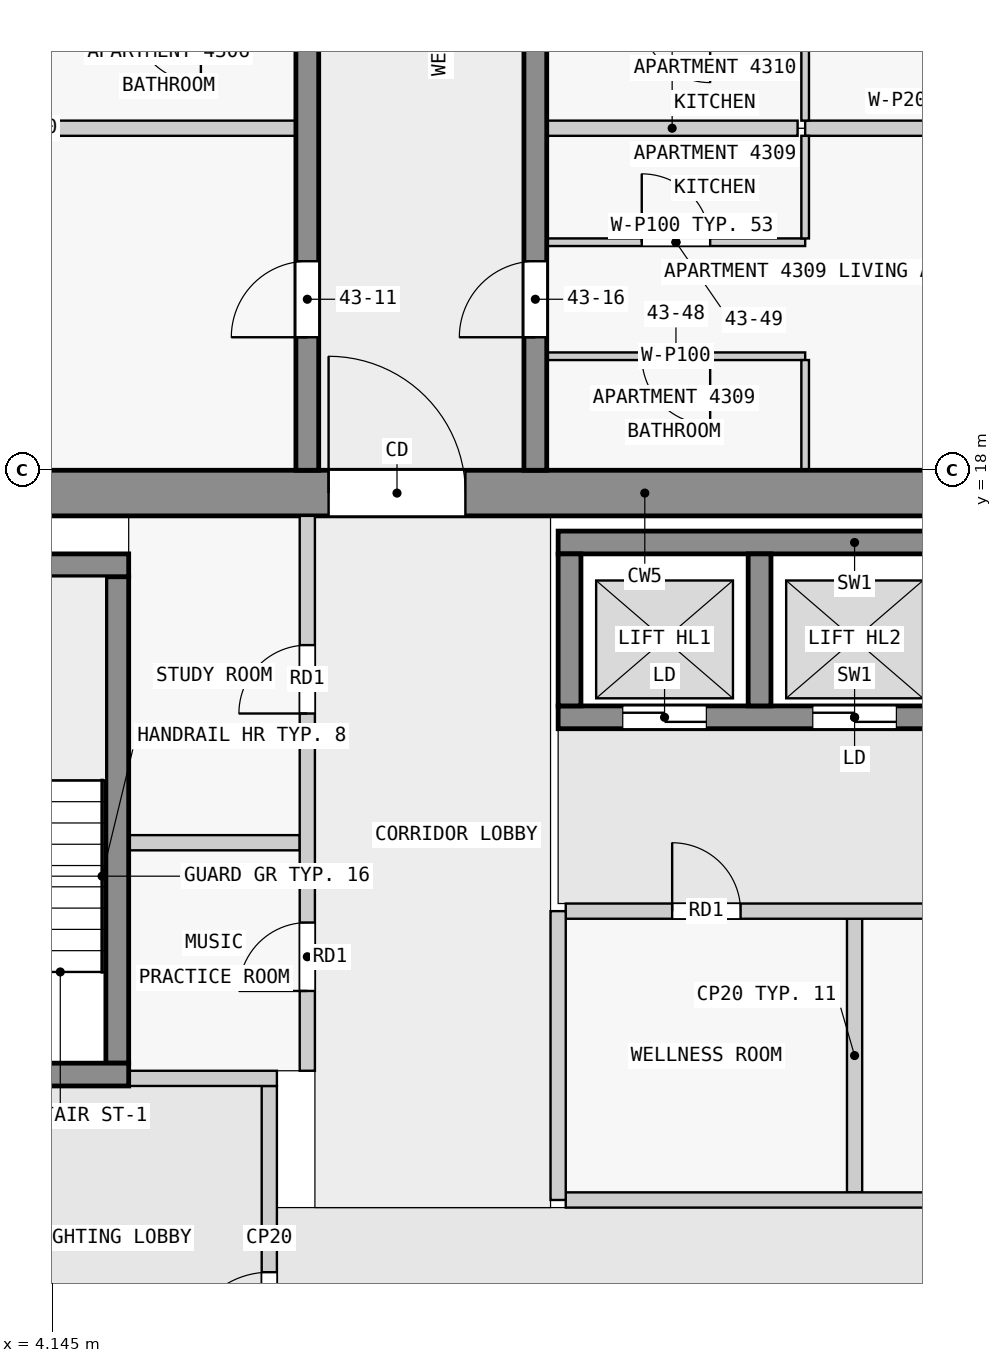
"""IFC4 building model, lengths in metres.
Left out: names, types, materials, properties, quantities, classifications, styles, units other than length and angle.
Written with IfcOpenShell. Run it as: python <this file> out.ifc"""

import sys

from ifc_helpers import new_model, si_unit, direction, frame, frame_2d, origin, place, context, subcontext, project, spatial, rectangle, extrude, element, fill, save


model = new_model("IFC4")
c1 = context("Model", 3, precision=1e-05, world=origin(), true_north=direction((0.0, 1.0)))
c2 = subcontext(c1, "Body", "Model", "MODEL_VIEW")
j1 = project(units=[si_unit("LENGTHUNIT", "METRE"), si_unit("PLANEANGLEUNIT", "RADIAN")], contexts=[c1])
p1 = place(None, origin())
s1 = spatial("IfcSite", under=j1, at=p1, CompositionType="ELEMENT")
p2 = place(p1, origin())
s2 = spatial("IfcBuilding", under=s1, at=p2, CompositionType="ELEMENT")
p3 = place(p2, frame((0.0, 0.0, 167.4)))
s3 = spatial("IfcBuildingStorey", under=s2, at=p3, CompositionType="ELEMENT", Elevation=167.4)
p4 = place(p3, frame((1.38, 17.7, 0.0), z_axis=(0.0, 0.0, 1.0), x_axis=(1.0, 0.0, 0.0)))
e1 = element("IfcWall", 1, at=p4, inside=s3, PredefinedType="SHEAR", context=c2, shape_type="SweptSolid", body=[
    extrude(rectangle(XDim=21.12, YDim=0.6, at=frame_2d((10.56, 0.0))), origin(), (0.0, 0.0, 1.0), 3.25),
])
p5 = place(p4, frame((6.4, 0.0, 0.0)))
e2 = element("IfcOpeningElement", 2, at=p5, cuts=e1, PredefinedType="OPENING", context=c2, shape_type="SweptSolid", body=[
    extrude(rectangle(XDim=1.8, YDim=2.1, at=frame_2d((0.9, 1.05))), frame((0.0, 0.31, 0.0), z_axis=(0.0, -1.0, 0.0), x_axis=(1.0, 0.0, 0.0)), (0.0, 0.0, 1.0), 0.62),
])
p6 = place(p3, frame((2.3, 10.05, 0.0), z_axis=(0.0, 0.0, 1.0), x_axis=(1.0, 0.0, 0.0)))
e3 = element("IfcWall", 3, at=p6, inside=s3, PredefinedType="SHEAR", context=c2, shape_type="SweptSolid", body=[
    extrude(rectangle(XDim=2.85, YDim=0.3, at=frame_2d((1.425, 0.0))), origin(), (0.0, 0.0, 1.0), 3.25),
])
p7 = place(p6, frame((0.25, 0.0, 0.0)))
e4 = element("IfcOpeningElement", 4, at=p7, cuts=e3, PredefinedType="OPENING", context=c2, shape_type="SweptSolid", body=[
    extrude(rectangle(XDim=1.1, YDim=2.1, at=frame_2d((0.55, 1.05))), frame((0.0, 0.16, 0.0), z_axis=(0.0, -1.0, 0.0), x_axis=(1.0, 0.0, 0.0)), (0.0, 0.0, 1.0), 0.32),
])
p8 = place(p3, frame((5.0, 10.2, 0.0), z_axis=(0.0, 0.0, 1.0), x_axis=(0.0, 1.0, 0.0)))
e5 = element("IfcWall", 5, at=p8, inside=s3, PredefinedType="SHEAR", context=c2, shape_type="SweptSolid", body=[
    extrude(rectangle(XDim=6.4, YDim=0.3, at=frame_2d((3.2, 0.0))), origin(), (0.0, 0.0, 1.0), 3.25),
])
p9 = place(p3, frame((2.3, 16.75, 0.0), z_axis=(0.0, 0.0, 1.0), x_axis=(1.0, 0.0, 0.0)))
e6 = element("IfcWall", 6, at=p9, inside=s3, PredefinedType="SHEAR", context=c2, shape_type="SweptSolid", body=[
    extrude(rectangle(XDim=2.85, YDim=0.3, at=frame_2d((1.425, 0.0))), origin(), (0.0, 0.0, 1.0), 3.25),
])
p10 = place(p3, frame((10.8, 17.05, 0.0), z_axis=(0.0, 0.0, 1.0), x_axis=(1.0, 0.0, 0.0)))
e7 = element("IfcWall", 7, at=p10, inside=s3, PredefinedType="SHEAR", context=c2, shape_type="SweptSolid", body=[
    extrude(rectangle(XDim=7.8, YDim=0.3, at=frame_2d((3.9, 0.0))), origin(), (0.0, 0.0, 1.0), 3.25),
])
p11 = place(p3, frame((10.8, 14.75, 0.0), z_axis=(0.0, 0.0, 1.0), x_axis=(1.0, 0.0, 0.0)))
e8 = element("IfcWall", 8, at=p11, inside=s3, PredefinedType="SHEAR", context=c2, shape_type="SweptSolid", body=[
    extrude(rectangle(XDim=7.8, YDim=0.3, at=frame_2d((3.9, 0.0))), origin(), (0.0, 0.0, 1.0), 3.25),
])
p12 = place(p11, frame((0.85, 0.0, 0.0)))
e9 = element("IfcOpeningElement", 9, at=p12, cuts=e8, PredefinedType="OPENING", context=c2, shape_type="SweptSolid", body=[
    extrude(rectangle(XDim=1.1, YDim=2.1, at=frame_2d((0.55, 1.05))), frame((0.0, 0.16, 0.0), z_axis=(0.0, -1.0, 0.0), x_axis=(1.0, 0.0, 0.0)), (0.0, 0.0, 1.0), 0.32),
])
p13 = place(p11, frame((3.35, 0.0, 0.0)))
e10 = element("IfcOpeningElement", 10, at=p13, cuts=e8, PredefinedType="OPENING", context=c2, shape_type="SweptSolid", body=[
    extrude(rectangle(XDim=1.1, YDim=2.1, at=frame_2d((0.55, 1.05))), frame((0.0, 0.16, 0.0), z_axis=(0.0, -1.0, 0.0), x_axis=(1.0, 0.0, 0.0)), (0.0, 0.0, 1.0), 0.32),
])
p14 = place(p11, frame((5.85, 0.0, 0.0)))
e11 = element("IfcOpeningElement", 11, at=p14, cuts=e8, PredefinedType="OPENING", context=c2, shape_type="SweptSolid", body=[
    extrude(rectangle(XDim=1.1, YDim=2.1, at=frame_2d((0.55, 1.05))), frame((0.0, 0.16, 0.0), z_axis=(0.0, -1.0, 0.0), x_axis=(1.0, 0.0, 0.0)), (0.0, 0.0, 1.0), 0.32),
])
for number, where, z_axis, x_axis in (
    (12, (10.95, 14.9, 0.0), (0.0, 0.0, 1.0), (0.0, 1.0, 0.0)),
    (13, (13.45, 14.9, 0.0), (0.0, 0.0, 1.0), (0.0, 1.0, 0.0)),
):
    element("IfcWall", number, at=place(p3, frame(where, z_axis=z_axis, x_axis=x_axis)), inside=s3, PredefinedType="SHEAR", context=c2, shape_type="SweptSolid", body=[
        extrude(rectangle(XDim=2.0, YDim=0.3, at=frame_2d((1.0, 0.0))), origin(), (0.0, 0.0, 1.0), 3.25),
    ])
p15 = place(p3, frame((7.5, 18.0, 0.0), z_axis=(0.0, 0.0, 1.0), x_axis=(0.0, 1.0, 0.0)))
e14 = element("IfcWall", 14, at=p15, inside=s3, PredefinedType="SHEAR", context=c2, shape_type="SweptSolid", body=[
    extrude(rectangle(XDim=27.0, YDim=0.3, at=frame_2d((13.5, 0.0))), origin(), (0.0, 0.0, 1.0), 3.25),
])
p16 = place(p15, frame((1.75, 0.0, 0.0)))
e15 = element("IfcOpeningElement", 15, at=p16, cuts=e14, PredefinedType="OPENING", context=c2, shape_type="SweptSolid", body=[
    extrude(rectangle(XDim=1.0, YDim=2.1, at=frame_2d((0.5, 1.05))), frame((0.0, 0.16, 0.0), z_axis=(0.0, -1.0, 0.0), x_axis=(1.0, 0.0, 0.0)), (0.0, 0.0, 1.0), 0.32),
])
p17 = place(p15, frame((6.25, 0.0, 0.0)))
e16 = element("IfcOpeningElement", 16, at=p17, cuts=e14, PredefinedType="OPENING", context=c2, shape_type="SweptSolid", body=[
    extrude(rectangle(XDim=1.0, YDim=2.1, at=frame_2d((0.5, 1.05))), frame((0.0, 0.16, 0.0), z_axis=(0.0, -1.0, 0.0), x_axis=(1.0, 0.0, 0.0)), (0.0, 0.0, 1.0), 0.32),
])
p18 = place(p15, frame((10.75, 0.0, 0.0)))
e17 = element("IfcOpeningElement", 17, at=p18, cuts=e14, PredefinedType="OPENING", context=c2, shape_type="SweptSolid", body=[
    extrude(rectangle(XDim=1.0, YDim=2.1, at=frame_2d((0.5, 1.05))), frame((0.0, 0.16, 0.0), z_axis=(0.0, -1.0, 0.0), x_axis=(1.0, 0.0, 0.0)), (0.0, 0.0, 1.0), 0.32),
])
p19 = place(p15, frame((15.25, 0.0, 0.0)))
e18 = element("IfcOpeningElement", 18, at=p19, cuts=e14, PredefinedType="OPENING", context=c2, shape_type="SweptSolid", body=[
    extrude(rectangle(XDim=1.0, YDim=2.1, at=frame_2d((0.5, 1.05))), frame((0.0, 0.16, 0.0), z_axis=(0.0, -1.0, 0.0), x_axis=(1.0, 0.0, 0.0)), (0.0, 0.0, 1.0), 0.32),
])
p20 = place(p15, frame((21.35, 0.0, 0.0)))
e19 = element("IfcOpeningElement", 19, at=p20, cuts=e14, PredefinedType="OPENING", context=c2, shape_type="SweptSolid", body=[
    extrude(rectangle(XDim=1.0, YDim=2.1, at=frame_2d((0.5, 1.05))), frame((0.0, 0.16, 0.0), z_axis=(0.0, -1.0, 0.0), x_axis=(1.0, 0.0, 0.0)), (0.0, 0.0, 1.0), 0.32),
])
p21 = place(p3, frame((10.5, 18.0, 0.0), z_axis=(0.0, 0.0, 1.0), x_axis=(0.0, 1.0, 0.0)))
e20 = element("IfcWall", 20, at=p21, inside=s3, PredefinedType="SHEAR", context=c2, shape_type="SweptSolid", body=[
    extrude(rectangle(XDim=27.0, YDim=0.3, at=frame_2d((13.5, 0.0))), origin(), (0.0, 0.0, 1.0), 3.25),
])
p22 = place(p21, frame((1.75, 0.0, 0.0)))
e21 = element("IfcOpeningElement", 21, at=p22, cuts=e20, PredefinedType="OPENING", context=c2, shape_type="SweptSolid", body=[
    extrude(rectangle(XDim=1.0, YDim=2.1, at=frame_2d((0.5, 1.05))), frame((0.0, 0.16, 0.0), z_axis=(0.0, -1.0, 0.0), x_axis=(1.0, 0.0, 0.0)), (0.0, 0.0, 1.0), 0.32),
])
p23 = place(p21, frame((6.25, 0.0, 0.0)))
e22 = element("IfcOpeningElement", 22, at=p23, cuts=e20, PredefinedType="OPENING", context=c2, shape_type="SweptSolid", body=[
    extrude(rectangle(XDim=1.0, YDim=2.1, at=frame_2d((0.5, 1.05))), frame((0.0, 0.16, 0.0), z_axis=(0.0, -1.0, 0.0), x_axis=(1.0, 0.0, 0.0)), (0.0, 0.0, 1.0), 0.32),
])
p24 = place(p21, frame((10.35, 0.0, 0.0)))
e23 = element("IfcOpeningElement", 23, at=p24, cuts=e20, PredefinedType="OPENING", context=c2, shape_type="SweptSolid", body=[
    extrude(rectangle(XDim=1.8, YDim=2.1, at=frame_2d((0.9, 1.05))), frame((0.0, 0.16, 0.0), z_axis=(0.0, -1.0, 0.0), x_axis=(1.0, 0.0, 0.0)), (0.0, 0.0, 1.0), 0.32),
])
p25 = place(p21, frame((17.55, 0.0, 0.0)))
e24 = element("IfcOpeningElement", 24, at=p25, cuts=e20, PredefinedType="OPENING", context=c2, shape_type="SweptSolid", body=[
    extrude(rectangle(XDim=1.0, YDim=2.1, at=frame_2d((0.5, 1.05))), frame((0.0, 0.16, 0.0), z_axis=(0.0, -1.0, 0.0), x_axis=(1.0, 0.0, 0.0)), (0.0, 0.0, 1.0), 0.32),
])
p26 = place(p21, frame((23.25, 0.0, 0.0)))
e25 = element("IfcOpeningElement", 25, at=p26, cuts=e20, PredefinedType="OPENING", context=c2, shape_type="SweptSolid", body=[
    extrude(rectangle(XDim=0.9, YDim=2.1, at=frame_2d((0.45, 1.05))), frame((0.0, 0.16, 0.0), z_axis=(0.0, -1.0, 0.0), x_axis=(1.0, 0.0, 0.0)), (0.0, 0.0, 1.0), 0.32),
])
p27 = place(p21, frame((25.45, 0.0, 0.0)))
e26 = element("IfcOpeningElement", 26, at=p27, cuts=e20, PredefinedType="OPENING", context=c2, shape_type="SweptSolid", body=[
    extrude(rectangle(XDim=1.0, YDim=2.1, at=frame_2d((0.5, 1.05))), frame((0.0, 0.16, 0.0), z_axis=(0.0, -1.0, 0.0), x_axis=(1.0, 0.0, 0.0)), (0.0, 0.0, 1.0), 0.32),
])
p28 = place(p3, frame((7.0, 5.9, 0.0), z_axis=(0.0, 0.0, 1.0), x_axis=(0.0, 1.0, 0.0)))
e27 = element("IfcWall", 27, at=p28, inside=s3, PredefinedType="PARTITIONING", context=c2, shape_type="SweptSolid", body=[
    extrude(rectangle(XDim=4.0, YDim=0.2, at=frame_2d((2.0, 0.0))), origin(), (0.0, 0.0, 1.0), 3.25),
])
p29 = place(p28, frame((0.45, 0.0, 0.0)))
e28 = element("IfcOpeningElement", 28, at=p29, cuts=e27, PredefinedType="OPENING", context=c2, shape_type="SweptSolid", body=[
    extrude(rectangle(XDim=1.1, YDim=2.1, at=frame_2d((0.55, 1.05))), frame((0.0, 0.11, 0.0), z_axis=(0.0, -1.0, 0.0), x_axis=(1.0, 0.0, 0.0)), (0.0, 0.0, 1.0), 0.22),
])
p30 = place(p3, frame((5.15, 10.0, 0.0), z_axis=(0.0, 0.0, 1.0), x_axis=(1.0, 0.0, 0.0)))
e29 = element("IfcWall", 29, at=p30, inside=s3, PredefinedType="PARTITIONING", context=c2, shape_type="SweptSolid", body=[
    extrude(rectangle(XDim=1.95, YDim=0.2, at=frame_2d((0.975, 0.0))), origin(), (0.0, 0.0, 1.0), 3.25),
])
p31 = place(p3, frame((10.8, 8.4, 0.0), z_axis=(0.0, 0.0, 1.0), x_axis=(0.0, 1.0, 0.0)))
e30 = element("IfcWall", 30, at=p31, inside=s3, PredefinedType="PARTITIONING", context=c2, shape_type="SweptSolid", body=[
    extrude(rectangle(XDim=3.8, YDim=0.2, at=frame_2d((1.9, 0.0))), origin(), (0.0, 0.0, 1.0), 3.25),
])
p32 = place(p3, frame((10.9, 8.4, 0.0), z_axis=(0.0, 0.0, 1.0), x_axis=(1.0, 0.0, 0.0)))
e31 = element("IfcWall", 31, at=p32, inside=s3, PredefinedType="PARTITIONING", context=c2, shape_type="SweptSolid", body=[
    extrude(rectangle(XDim=8.5, YDim=0.2, at=frame_2d((4.25, 0.0))), origin(), (0.0, 0.0, 1.0), 3.25),
])
p33 = place(p3, frame((10.9, 12.2, 0.0), z_axis=(0.0, 0.0, 1.0), x_axis=(1.0, 0.0, 0.0)))
e32 = element("IfcWall", 32, at=p33, inside=s3, PredefinedType="PARTITIONING", context=c2, shape_type="SweptSolid", body=[
    extrude(rectangle(XDim=8.5, YDim=0.2, at=frame_2d((4.25, 0.0))), origin(), (0.0, 0.0, 1.0), 3.25),
])
p34 = place(p33, frame((1.4, 0.0, 0.0)))
e33 = element("IfcOpeningElement", 33, at=p34, cuts=e32, PredefinedType="OPENING", context=c2, shape_type="SweptSolid", body=[
    extrude(rectangle(XDim=0.9, YDim=2.1, at=frame_2d((0.45, 1.05))), frame((0.0, 0.11, 0.0), z_axis=(0.0, -1.0, 0.0), x_axis=(1.0, 0.0, 0.0)), (0.0, 0.0, 1.0), 0.22),
])
p35 = place(p33, frame((5.75, 0.0, 0.0)))
e34 = element("IfcOpeningElement", 34, at=p35, cuts=e32, PredefinedType="OPENING", context=c2, shape_type="SweptSolid", body=[
    extrude(rectangle(XDim=0.9, YDim=2.1, at=frame_2d((0.45, 1.05))), frame((0.0, 0.11, 0.0), z_axis=(0.0, -1.0, 0.0), x_axis=(1.0, 0.0, 0.0)), (0.0, 0.0, 1.0), 0.22),
])
p36 = place(p3, frame((14.7, 8.5, 0.0), z_axis=(0.0, 0.0, 1.0), x_axis=(0.0, 1.0, 0.0)))
e35 = element("IfcWall", 35, at=p36, inside=s3, PredefinedType="PARTITIONING", context=c2, shape_type="SweptSolid", body=[
    extrude(rectangle(XDim=3.6, YDim=0.2, at=frame_2d((1.8, 0.0))), origin(), (0.0, 0.0, 1.0), 3.25),
])
p37 = place(p3, frame((7.5, 10.1, 0.0), z_axis=(0.0, 0.0, 1.0), x_axis=(0.0, 1.0, 0.0)))
e36 = element("IfcWall", 36, at=p37, inside=s3, PredefinedType="PARTITIONING", context=c2, shape_type="SweptSolid", body=[
    extrude(rectangle(XDim=7.3, YDim=0.2, at=frame_2d((3.65, 0.0))), origin(), (0.0, 0.0, 1.0), 3.25),
])
p38 = place(p37, frame((1.05, 0.0, 0.0)))
e37 = element("IfcOpeningElement", 37, at=p38, cuts=e36, PredefinedType="OPENING", context=c2, shape_type="SweptSolid", body=[
    extrude(rectangle(XDim=0.9, YDim=2.1, at=frame_2d((0.45, 1.05))), frame((0.0, 0.11, 0.0), z_axis=(0.0, -1.0, 0.0), x_axis=(1.0, 0.0, 0.0)), (0.0, 0.0, 1.0), 0.22),
])
p39 = place(p37, frame((4.7, 0.0, 0.0)))
e38 = element("IfcOpeningElement", 38, at=p39, cuts=e36, PredefinedType="OPENING", context=c2, shape_type="SweptSolid", body=[
    extrude(rectangle(XDim=0.9, YDim=2.1, at=frame_2d((0.45, 1.05))), frame((0.0, 0.11, 0.0), z_axis=(0.0, -1.0, 0.0), x_axis=(1.0, 0.0, 0.0)), (0.0, 0.0, 1.0), 0.22),
])
p40 = place(p3, frame((5.15, 13.1, 0.0), z_axis=(0.0, 0.0, 1.0), x_axis=(1.0, 0.0, 0.0)))
e39 = element("IfcWall", 39, at=p40, inside=s3, PredefinedType="PARTITIONING", context=c2, shape_type="SweptSolid", body=[
    extrude(rectangle(XDim=2.25, YDim=0.2, at=frame_2d((1.125, 0.0))), origin(), (0.0, 0.0, 1.0), 3.25),
])
p41 = place(p3, frame((14.05, 19.5, 0.0), z_axis=(0.0, 0.0, 1.0), x_axis=(-1.0, 0.0, 0.0)))
e40 = element("IfcWall", 40, at=p41, inside=s3, PredefinedType="PARTITIONING", context=c2, shape_type="SweptSolid", body=[
    extrude(rectangle(XDim=3.4, YDim=0.1, at=frame_2d((1.7, 0.0))), origin(), (0.0, 0.0, 1.0), 3.25),
])
p42 = place(p41, frame((1.25, 0.0, 0.0)))
e41 = element("IfcOpeningElement", 41, at=p42, cuts=e40, PredefinedType="OPENING", context=c2, shape_type="SweptSolid", body=[
    extrude(rectangle(XDim=0.9, YDim=2.1, at=frame_2d((0.45, 1.05))), frame((0.0, 0.06, 0.0), z_axis=(0.0, -1.0, 0.0), x_axis=(1.0, 0.0, 0.0)), (0.0, 0.0, 1.0), 0.12),
])
p43 = place(p3, frame((10.65, 21.0, 0.0), z_axis=(0.0, 0.0, 1.0), x_axis=(1.0, 0.0, 0.0)))
e42 = element("IfcWall", 42, at=p43, inside=s3, PredefinedType="PARTITIONING", context=c2, shape_type="SweptSolid", body=[
    extrude(rectangle(XDim=3.4, YDim=0.1, at=frame_2d((1.7, 0.0))), origin(), (0.0, 0.0, 1.0), 3.25),
])
p44 = place(p43, frame((1.25, 0.0, 0.0)))
e43 = element("IfcOpeningElement", 43, at=p44, cuts=e42, PredefinedType="OPENING", context=c2, shape_type="SweptSolid", body=[
    extrude(rectangle(XDim=0.9, YDim=2.1, at=frame_2d((0.45, 1.05))), frame((0.0, 0.06, 0.0), z_axis=(0.0, -1.0, 0.0), x_axis=(1.0, 0.0, 0.0)), (0.0, 0.0, 1.0), 0.12),
])
p45 = place(p3, frame((7.35, 22.5, 0.0), z_axis=(0.0, 0.0, 1.0), x_axis=(-1.0, 0.0, 0.0)))
e44 = element("IfcWall", 44, at=p45, inside=s3, PredefinedType="PARTITIONING", context=c2, shape_type="SweptSolid", body=[
    extrude(rectangle(XDim=7.2, YDim=0.2, at=frame_2d((3.6, 0.0))), origin(), (0.0, 0.0, 1.0), 3.25),
])
p46 = place(p3, frame((13.95, 22.5, 0.0), z_axis=(0.0, 0.0, 1.0), x_axis=(-1.0, 0.0, 0.0)))
e45 = element("IfcWall", 45, at=p46, inside=s3, PredefinedType="PARTITIONING", context=c2, shape_type="SweptSolid", body=[
    extrude(rectangle(XDim=3.3, YDim=0.2, at=frame_2d((1.65, 0.0))), origin(), (0.0, 0.0, 1.0), 3.25),
])
p47 = place(p3, frame((14.05, 22.5, 0.0), z_axis=(0.0, 0.0, 1.0), x_axis=(1.0, 0.0, 0.0)))
e46 = element("IfcWall", 46, at=p47, inside=s3, PredefinedType="PARTITIONING", context=c2, shape_type="SweptSolid", body=[
    extrude(rectangle(XDim=3.8, YDim=0.2, at=frame_2d((1.9, 0.0))), origin(), (0.0, 0.0, 1.0), 3.25),
])
p48 = place(p3, frame((14.05, 18.0, 0.0), z_axis=(0.0, 0.0, 1.0), x_axis=(0.0, 1.0, 0.0)))
e47 = element("IfcWall", 47, at=p48, inside=s3, PredefinedType="PARTITIONING", context=c2, shape_type="SweptSolid", body=[
    extrude(rectangle(XDim=1.45, YDim=0.1, at=frame_2d((0.725, 0.0))), origin(), (0.0, 0.0, 1.0), 3.25),
])
for number, where, z_axis, x_axis in (
    (48, (14.05, 21.05, 0.0), (0.0, 0.0, 1.0), (0.0, 1.0, 0.0)),
    (49, (14.05, 22.6, 0.0), (0.0, 0.0, 1.0), (0.0, 1.0, 0.0)),
):
    element("IfcWall", number, at=place(p3, frame(where, z_axis=z_axis, x_axis=x_axis)), inside=s3, PredefinedType="PARTITIONING", context=c2, shape_type="SweptSolid", body=[
        extrude(rectangle(XDim=1.35, YDim=0.1, at=frame_2d((0.675, 0.0))), origin(), (0.0, 0.0, 1.0), 3.25),
    ])
p49 = place(p29, origin())
e50 = element("IfcDoor", 50, at=p49, inside=s3, OperationType="SINGLE_SWING_LEFT", PredefinedType="DOOR", context=c2, shape_type="SweptSolid", body=[
    extrude(rectangle(XDim=1.1, YDim=2.1, at=frame_2d((0.55, 1.05))), frame((0.0, 0.025, 0.0), z_axis=(0.0, -1.0, 0.0), x_axis=(1.0, 0.0, 0.0)), (0.0, 0.0, 1.0), 0.05),
])
fill(e28, e50)
p50 = place(p34, origin())
e51 = element("IfcDoor", 51, at=p50, inside=s3, OperationType="SINGLE_SWING_LEFT", PredefinedType="DOOR", context=c2, shape_type="SweptSolid", body=[
    extrude(rectangle(XDim=0.9, YDim=2.1, at=frame_2d((0.45, 1.05))), frame((0.0, 0.025, 0.0), z_axis=(0.0, -1.0, 0.0), x_axis=(1.0, 0.0, 0.0)), (0.0, 0.0, 1.0), 0.05),
])
fill(e33, e51)
p51 = place(p12, origin())
e52 = element("IfcDoor", 52, at=p51, inside=s3, OperationType="DOUBLE_DOOR_SLIDING", PredefinedType="DOOR", context=c2, shape_type="SweptSolid", body=[
    extrude(rectangle(XDim=1.1, YDim=2.1, at=frame_2d((0.55, 1.05))), frame((0.0, 0.025, 0.0), z_axis=(0.0, -1.0, 0.0), x_axis=(1.0, 0.0, 0.0)), (0.0, 0.0, 1.0), 0.05),
])
fill(e9, e52)
p52 = place(p13, origin())
e53 = element("IfcDoor", 53, at=p52, inside=s3, OperationType="DOUBLE_DOOR_SLIDING", PredefinedType="DOOR", context=c2, shape_type="SweptSolid", body=[
    extrude(rectangle(XDim=1.1, YDim=2.1, at=frame_2d((0.55, 1.05))), frame((0.0, 0.025, 0.0), z_axis=(0.0, -1.0, 0.0), x_axis=(1.0, 0.0, 0.0)), (0.0, 0.0, 1.0), 0.05),
])
fill(e10, e53)
p53 = place(p5, origin())
e54 = element("IfcDoor", 54, at=p53, inside=s3, OperationType="DOUBLE_DOOR_SINGLE_SWING", PredefinedType="DOOR", context=c2, shape_type="SweptSolid", body=[
    extrude(rectangle(XDim=1.8, YDim=2.1, at=frame_2d((0.9, 1.05))), frame((0.0, 0.025, 0.0), z_axis=(0.0, -1.0, 0.0), x_axis=(1.0, 0.0, 0.0)), (0.0, 0.0, 1.0), 0.05),
])
fill(e2, e54)
p54 = place(p38, origin())
e55 = element("IfcDoor", 55, at=p54, inside=s3, OperationType="SINGLE_SWING_RIGHT", PredefinedType="DOOR", context=c2, shape_type="SweptSolid", body=[
    extrude(rectangle(XDim=0.9, YDim=2.1, at=frame_2d((0.45, 1.05))), frame((0.0, 0.025, 0.0), z_axis=(0.0, -1.0, 0.0), x_axis=(1.0, 0.0, 0.0)), (0.0, 0.0, 1.0), 0.05),
])
fill(e37, e55)
p55 = place(p39, origin())
e56 = element("IfcDoor", 56, at=p55, inside=s3, OperationType="SINGLE_SWING_RIGHT", PredefinedType="DOOR", context=c2, shape_type="SweptSolid", body=[
    extrude(rectangle(XDim=0.9, YDim=2.1, at=frame_2d((0.45, 1.05))), frame((0.0, 0.025, 0.0), z_axis=(0.0, -1.0, 0.0), x_axis=(1.0, 0.0, 0.0)), (0.0, 0.0, 1.0), 0.05),
])
fill(e38, e56)
p56 = place(p16, origin())
e57 = element("IfcDoor", 57, at=p56, inside=s3, OperationType="SINGLE_SWING_LEFT", PredefinedType="DOOR", context=c2, shape_type="SweptSolid", body=[
    extrude(rectangle(XDim=1.0, YDim=2.1, at=frame_2d((0.5, 1.05))), frame((0.0, 0.025, 0.0), z_axis=(0.0, -1.0, 0.0), x_axis=(1.0, 0.0, 0.0)), (0.0, 0.0, 1.0), 0.05),
])
fill(e15, e57)
p57 = place(p22, origin())
e58 = element("IfcDoor", 58, at=p57, inside=s3, OperationType="SINGLE_SWING_LEFT", PredefinedType="DOOR", context=c2, shape_type="SweptSolid", body=[
    extrude(rectangle(XDim=1.0, YDim=2.1, at=frame_2d((0.5, 1.05))), frame((0.0, 0.025, 0.0), z_axis=(0.0, -1.0, 0.0), x_axis=(1.0, 0.0, 0.0)), (0.0, 0.0, 1.0), 0.05),
])
fill(e21, e58)
p58 = place(p42, origin())
e59 = element("IfcDoor", 59, at=p58, inside=s3, OperationType="SINGLE_SWING_LEFT", PredefinedType="DOOR", context=c2, shape_type="SweptSolid", body=[
    extrude(rectangle(XDim=0.9, YDim=2.1, at=frame_2d((0.45, 1.05))), frame((0.0, 0.025, 0.0), z_axis=(0.0, -1.0, 0.0), x_axis=(1.0, 0.0, 0.0)), (0.0, 0.0, 1.0), 0.05),
])
fill(e41, e59)
p59 = place(p44, origin())
e60 = element("IfcDoor", 60, at=p59, inside=s3, OperationType="SINGLE_SWING_LEFT", PredefinedType="DOOR", context=c2, shape_type="SweptSolid", body=[
    extrude(rectangle(XDim=0.9, YDim=2.1, at=frame_2d((0.45, 1.05))), frame((0.0, 0.025, 0.0), z_axis=(0.0, -1.0, 0.0), x_axis=(1.0, 0.0, 0.0)), (0.0, 0.0, 1.0), 0.05),
])
fill(e43, e60)
save(model, sys.argv[1])
